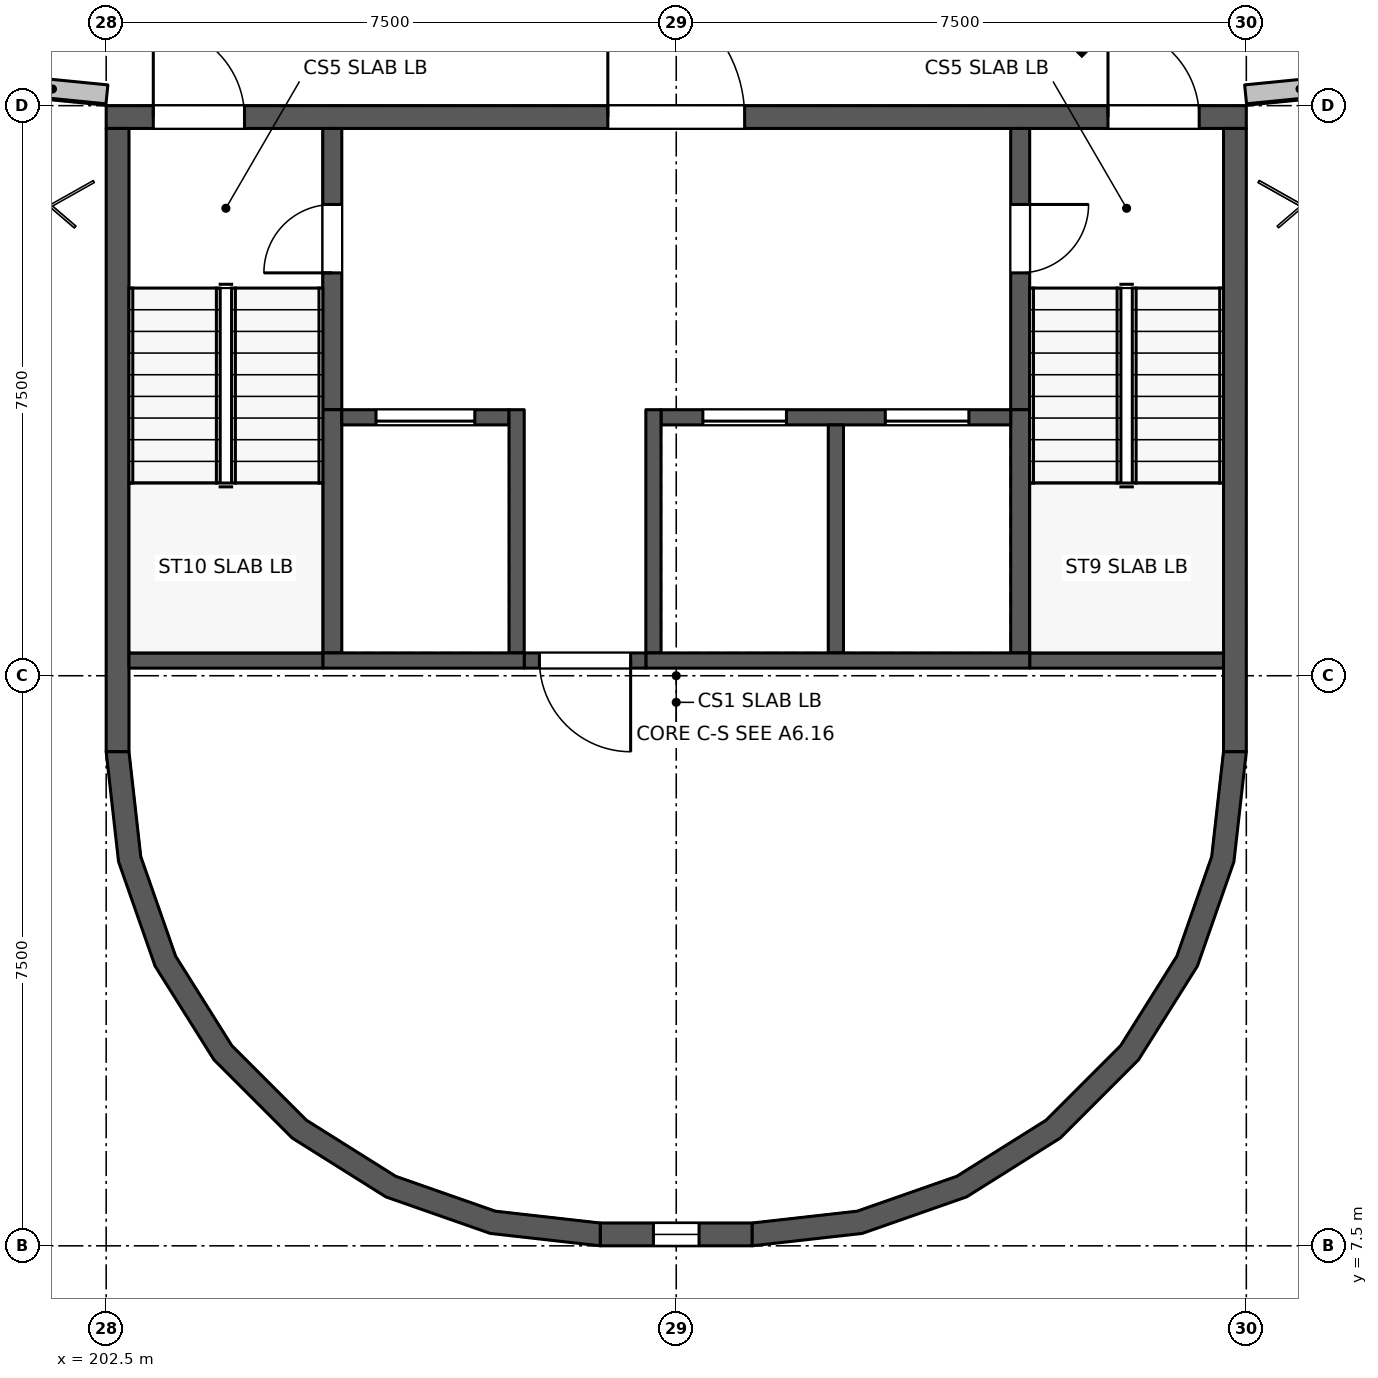
"""IFC4 building model, lengths in metres.
Left out: names, types, materials, properties, quantities, classifications, styles, units other than length and angle.
Written with IfcOpenShell. Run it as: python <this file> out.ifc"""

import sys

from ifc_helpers import new_model, si_unit, direction, frame, frame_2d, origin, place, context, subcontext, project, spatial, polyline, rectangle, outline, extrude, element, fill, save


model = new_model("IFC4")
c1 = context("Model", 3, precision=1e-05, world=origin(), true_north=direction((0.0, 1.0)))
c2 = subcontext(c1, "Body", "Model", "MODEL_VIEW")
j1 = project(units=[si_unit("LENGTHUNIT", "METRE"), si_unit("PLANEANGLEUNIT", "RADIAN")], contexts=[c1])
p1 = place(None, origin())
s1 = spatial("IfcSite", under=j1, at=p1, CompositionType="ELEMENT")
p2 = place(p1, origin())
s2 = spatial("IfcBuilding", under=s1, at=p2, CompositionType="ELEMENT")
p3 = place(p2, frame((0.0, 0.0, 6.6)))
s3 = spatial("IfcBuildingStorey", under=s2, at=p3, CompositionType="ELEMENT", Elevation=6.6)
p4 = place(p3, frame((201.077, 22.79, 0.0), z_axis=(0.0, 0.0, 1.0), x_axis=(0.995137391066, -0.098496562898, 0.0)))
e1 = element("IfcWall", 1, at=p4, inside=s3, PredefinedType="SOLIDWALL", context=c2, shape_type="SweptSolid", body=[
    extrude(rectangle(XDim=1.44, YDim=0.25, at=frame_2d((0.72, 0.0))), origin(), (0.0, 0.0, 1.0), 1.1),
])
p5 = place(p3, frame((217.49, 22.648, 0.0), z_axis=(0.0, 0.0, 1.0), x_axis=(0.995122410186, 0.098647801521, 0.0)))
e2 = element("IfcWall", 2, at=p5, inside=s3, PredefinedType="SOLIDWALL", context=c2, shape_type="SweptSolid", body=[
    extrude(rectangle(XDim=1.44, YDim=0.25, at=frame_2d((0.72, 0.0))), origin(), (0.0, 0.0, 1.0), 1.1),
])
p6 = place(p3, frame((202.5, 22.35, 0.0), z_axis=(0.0, 0.0, 1.0), x_axis=(1.0, 0.0, 0.0)))
e3 = element("IfcWall", 3, at=p6, inside=s3, PredefinedType="SHEAR", context=c2, shape_type="SweptSolid", body=[
    extrude(rectangle(XDim=15.0, YDim=0.3, at=frame_2d((7.5, 0.0))), origin(), (0.0, 0.0, 1.0), 3.3),
])
p7 = place(p6, frame((13.18, 0.0, 0.0)))
e4 = element("IfcOpeningElement", 4, at=p7, cuts=e3, PredefinedType="OPENING", context=c2, shape_type="SweptSolid", body=[
    extrude(rectangle(XDim=1.2, YDim=2.1, at=frame_2d((0.6, 1.05))), frame((0.0, 0.16, 0.0), z_axis=(0.0, -1.0, 0.0), x_axis=(1.0, 0.0, 0.0)), (0.0, 0.0, 1.0), 0.32),
])
p8 = place(p6, frame((0.62, 0.0, 0.0)))
e5 = element("IfcOpeningElement", 5, at=p8, cuts=e3, PredefinedType="OPENING", context=c2, shape_type="SweptSolid", body=[
    extrude(rectangle(XDim=1.2, YDim=2.1, at=frame_2d((0.6, 1.05))), frame((0.0, 0.16, 0.0), z_axis=(0.0, -1.0, 0.0), x_axis=(1.0, 0.0, 0.0)), (0.0, 0.0, 1.0), 0.32),
])
p9 = place(p6, frame((6.6, 0.0, 0.0)))
e6 = element("IfcOpeningElement", 6, at=p9, cuts=e3, PredefinedType="OPENING", context=c2, shape_type="SweptSolid", body=[
    extrude(rectangle(XDim=1.8, YDim=2.1, at=frame_2d((0.9, 1.05))), frame((0.0, 0.16, 0.0), z_axis=(0.0, -1.0, 0.0), x_axis=(1.0, 0.0, 0.0)), (0.0, 0.0, 1.0), 0.32),
])
p10 = place(p3, frame((211.0, 7.65, 0.0), z_axis=(0.0, 0.0, 1.0), x_axis=(-1.0, 0.0, 0.0)))
e7 = element("IfcWall", 7, at=p10, inside=s3, PredefinedType="SHEAR", context=c2, shape_type="SweptSolid", body=[
    extrude(rectangle(XDim=2.0, YDim=0.3, at=frame_2d((1.0, 0.0))), origin(), (0.0, 0.0, 1.0), 3.3),
])
p11 = place(p10, frame((0.7, 0.0, 0.3)))
e8 = element("IfcOpeningElement", 8, at=p11, cuts=e7, PredefinedType="OPENING", context=c2, shape_type="SweptSolid", body=[
    extrude(rectangle(XDim=0.6, YDim=2.7, at=frame_2d((0.3, 1.35))), frame((0.0, 0.16, 0.0), z_axis=(0.0, -1.0, 0.0), x_axis=(1.0, 0.0, 0.0)), (0.0, 0.0, 1.0), 0.32),
])
for number, where, z_axis, x_axis in (
    (9, (217.35, 22.2, 0.0), (0.0, 0.0, 1.0), (0.0, -1.0, 0.0)),
    (10, (202.65, 14.0, 0.0), (0.0, 0.0, 1.0), (0.0, 1.0, 0.0)),
):
    element("IfcWall", number, at=place(p3, frame(where, z_axis=z_axis, x_axis=x_axis)), inside=s3, PredefinedType="SHEAR", context=c2, shape_type="SweptSolid", body=[
        extrude(rectangle(XDim=8.2, YDim=0.3, at=frame_2d((4.1, 0.0))), origin(), (0.0, 0.0, 1.0), 3.3),
    ])
p12 = place(p3, frame((214.525, 22.2, 0.0), z_axis=(0.0, 0.0, 1.0), x_axis=(0.0, -1.0, 0.0)))
e11 = element("IfcWall", 11, at=p12, inside=s3, PredefinedType="STANDARD", context=c2, shape_type="SweptSolid", body=[
    extrude(rectangle(XDim=3.7, YDim=0.25, at=frame_2d((1.85, 0.0))), origin(), (0.0, 0.0, 1.0), 3.1),
])
p13 = place(p12, frame((1.0, 0.0, 0.0)))
e12 = element("IfcOpeningElement", 12, at=p13, cuts=e11, PredefinedType="OPENING", context=c2, shape_type="SweptSolid", body=[
    extrude(rectangle(XDim=0.9, YDim=2.1, at=frame_2d((0.45, 1.05))), frame((0.0, 0.135, 0.0), z_axis=(0.0, -1.0, 0.0), x_axis=(1.0, 0.0, 0.0)), (0.0, 0.0, 1.0), 0.27),
])
p14 = place(p3, frame((214.525, 18.5, 0.0), z_axis=(0.0, 0.0, 1.0), x_axis=(0.0, -1.0, 0.0)))
e13 = element("IfcWall", 13, at=p14, inside=s3, PredefinedType="STANDARD", context=c2, shape_type="SweptSolid", body=[
    extrude(rectangle(XDim=3.2, YDim=0.25, at=frame_2d((1.6, 0.0))), origin(), (0.0, 0.0, 1.0), 3.1),
])
p15 = place(p3, frame((205.475, 18.5, 0.0), z_axis=(0.0, 0.0, 1.0), x_axis=(0.0, 1.0, 0.0)))
e14 = element("IfcWall", 14, at=p15, inside=s3, PredefinedType="STANDARD", context=c2, shape_type="SweptSolid", body=[
    extrude(rectangle(XDim=3.7, YDim=0.25, at=frame_2d((1.85, 0.0))), origin(), (0.0, 0.0, 1.0), 3.1),
])
p16 = place(p15, frame((1.8, 0.0, 0.0)))
e15 = element("IfcOpeningElement", 15, at=p16, cuts=e14, PredefinedType="OPENING", context=c2, shape_type="SweptSolid", body=[
    extrude(rectangle(XDim=0.9, YDim=2.1, at=frame_2d((0.45, 1.05))), frame((0.0, 0.135, 0.0), z_axis=(0.0, -1.0, 0.0), x_axis=(1.0, 0.0, 0.0)), (0.0, 0.0, 1.0), 0.27),
])
p17 = place(p3, frame((205.475, 18.5, 0.0), z_axis=(0.0, 0.0, 1.0), x_axis=(0.0, -1.0, 0.0)))
e16 = element("IfcWall", 16, at=p17, inside=s3, PredefinedType="STANDARD", context=c2, shape_type="SweptSolid", body=[
    extrude(rectangle(XDim=3.2, YDim=0.25, at=frame_2d((1.6, 0.0))), origin(), (0.0, 0.0, 1.0), 3.1),
])
p18 = place(p3, frame((214.4, 18.4, 0.0), z_axis=(0.0, 0.0, 1.0), x_axis=(-1.0, 0.0, 0.0)))
e17 = element("IfcWall", 17, at=p18, inside=s3, PredefinedType="STANDARD", context=c2, shape_type="SweptSolid", body=[
    extrude(rectangle(XDim=4.6, YDim=0.2, at=frame_2d((2.3, 0.0))), origin(), (0.0, 0.0, 1.0), 3.1),
])
p19 = place(p18, frame((0.55, 0.0, 0.0)))
e18 = element("IfcOpeningElement", 18, at=p19, cuts=e17, PredefinedType="OPENING", context=c2, shape_type="SweptSolid", body=[
    extrude(rectangle(XDim=1.1, YDim=2.1, at=frame_2d((0.55, 1.05))), frame((0.0, 0.11, 0.0), z_axis=(0.0, -1.0, 0.0), x_axis=(1.0, 0.0, 0.0)), (0.0, 0.0, 1.0), 0.22),
])
p20 = place(p18, frame((2.95, 0.0, 0.0)))
e19 = element("IfcOpeningElement", 19, at=p20, cuts=e17, PredefinedType="OPENING", context=c2, shape_type="SweptSolid", body=[
    extrude(rectangle(XDim=1.1, YDim=2.1, at=frame_2d((0.55, 1.05))), frame((0.0, 0.11, 0.0), z_axis=(0.0, -1.0, 0.0), x_axis=(1.0, 0.0, 0.0)), (0.0, 0.0, 1.0), 0.22),
])
p21 = place(p3, frame((207.8, 18.4, 0.0), z_axis=(0.0, 0.0, 1.0), x_axis=(-1.0, 0.0, 0.0)))
e20 = element("IfcWall", 20, at=p21, inside=s3, PredefinedType="STANDARD", context=c2, shape_type="SweptSolid", body=[
    extrude(rectangle(XDim=2.2, YDim=0.2, at=frame_2d((1.1, 0.0))), origin(), (0.0, 0.0, 1.0), 3.1),
])
p22 = place(p21, frame((0.45, 0.0, 0.0)))
e21 = element("IfcOpeningElement", 21, at=p22, cuts=e20, PredefinedType="OPENING", context=c2, shape_type="SweptSolid", body=[
    extrude(rectangle(XDim=1.3, YDim=2.1, at=frame_2d((0.65, 1.05))), frame((0.0, 0.11, 0.0), z_axis=(0.0, -1.0, 0.0), x_axis=(1.0, 0.0, 0.0)), (0.0, 0.0, 1.0), 0.22),
])
p23 = place(p3, frame((212.1, 18.3, 0.0), z_axis=(0.0, 0.0, 1.0), x_axis=(0.0, -1.0, 0.0)))
e22 = element("IfcWall", 22, at=p23, inside=s3, PredefinedType="STANDARD", context=c2, shape_type="SweptSolid", body=[
    extrude(rectangle(XDim=3.0, YDim=0.2, at=frame_2d((1.5, 0.0))), origin(), (0.0, 0.0, 1.0), 3.1),
])
for number, where, z_axis, x_axis in (
    (23, (209.7, 18.5, 0.0), (0.0, 0.0, 1.0), (0.0, -1.0, 0.0)),
    (24, (207.9, 18.5, 0.0), (0.0, 0.0, 1.0), (0.0, -1.0, 0.0)),
):
    element("IfcWall", number, at=place(p3, frame(where, z_axis=z_axis, x_axis=x_axis)), inside=s3, PredefinedType="STANDARD", context=c2, shape_type="SweptSolid", body=[
        extrude(rectangle(XDim=3.2, YDim=0.2, at=frame_2d((1.6, 0.0))), origin(), (0.0, 0.0, 1.0), 3.1),
    ])
p24 = place(p3, frame((217.2, 15.2, 0.0), z_axis=(0.0, 0.0, 1.0), x_axis=(-1.0, 0.0, 0.0)))
e25 = element("IfcWall", 25, at=p24, inside=s3, PredefinedType="STANDARD", context=c2, shape_type="SweptSolid", body=[
    extrude(rectangle(XDim=2.55, YDim=0.2, at=frame_2d((1.275, 0.0))), origin(), (0.0, 0.0, 1.0), 3.1),
])
p25 = place(p3, frame((214.65, 15.2, 0.0), z_axis=(0.0, 0.0, 1.0), x_axis=(-1.0, 0.0, 0.0)))
e26 = element("IfcWall", 26, at=p25, inside=s3, PredefinedType="STANDARD", context=c2, shape_type="SweptSolid", body=[
    extrude(rectangle(XDim=5.05, YDim=0.2, at=frame_2d((2.525, 0.0))), origin(), (0.0, 0.0, 1.0), 3.1),
])
p26 = place(p3, frame((209.6, 15.2, 0.0), z_axis=(0.0, 0.0, 1.0), x_axis=(-1.0, 0.0, 0.0)))
e27 = element("IfcWall", 27, at=p26, inside=s3, PredefinedType="STANDARD", context=c2, shape_type="SweptSolid", body=[
    extrude(rectangle(XDim=1.6, YDim=0.2, at=frame_2d((0.8, 0.0))), origin(), (0.0, 0.0, 1.0), 3.1),
])
p27 = place(p26, frame((0.2, 0.0, 0.0)))
e28 = element("IfcOpeningElement", 28, at=p27, cuts=e27, PredefinedType="OPENING", context=c2, shape_type="SweptSolid", body=[
    extrude(rectangle(XDim=1.2, YDim=2.1, at=frame_2d((0.6, 1.05))), frame((0.0, 0.11, 0.0), z_axis=(0.0, -1.0, 0.0), x_axis=(1.0, 0.0, 0.0)), (0.0, 0.0, 1.0), 0.22),
])
p28 = place(p3, frame((208.0, 15.2, 0.0), z_axis=(0.0, 0.0, 1.0), x_axis=(-1.0, 0.0, 0.0)))
e29 = element("IfcWall", 29, at=p28, inside=s3, PredefinedType="STANDARD", context=c2, shape_type="SweptSolid", body=[
    extrude(rectangle(XDim=2.65, YDim=0.2, at=frame_2d((1.325, 0.0))), origin(), (0.0, 0.0, 1.0), 3.1),
])
p29 = place(p3, frame((205.35, 15.2, 0.0), z_axis=(0.0, 0.0, 1.0), x_axis=(-1.0, 0.0, 0.0)))
e30 = element("IfcWall", 30, at=p29, inside=s3, PredefinedType="STANDARD", context=c2, shape_type="SweptSolid", body=[
    extrude(rectangle(XDim=2.55, YDim=0.2, at=frame_2d((1.275, 0.0))), origin(), (0.0, 0.0, 1.0), 3.1),
])
p30 = place(p3, origin())
e31 = element("IfcWall", 31, at=p30, inside=s3, PredefinedType="SHEAR", context=c2, shape_type="SweptSolid", body=[
    extrude(outline(polyline([(217.5, 14.0), (217.337, 12.554), (216.856, 11.18), (216.082, 9.947), (215.053, 8.918), (213.82, 8.144), (212.446, 7.663), (211.0, 7.5), (211.0, 7.8), (212.38, 7.955), (213.69, 8.414), (214.865, 9.153), (215.847, 10.135), (216.586, 11.31), (217.045, 12.62), (217.2, 14.0), (217.5, 14.0)])), origin(), (0.0, 0.0, 1.0), 3.3),
])
p31 = place(p3, origin())
e32 = element("IfcWall", 32, at=p31, inside=s3, PredefinedType="SHEAR", context=c2, shape_type="SweptSolid", body=[
    extrude(outline(polyline([(202.5, 14.0), (202.663, 12.554), (203.144, 11.18), (203.918, 9.947), (204.947, 8.918), (206.18, 8.144), (207.554, 7.663), (209.0, 7.5), (209.0, 7.8), (207.62, 7.955), (206.31, 8.414), (205.135, 9.153), (204.153, 10.135), (203.414, 11.31), (202.955, 12.62), (202.8, 14.0), (202.5, 14.0)])), origin(), (0.0, 0.0, 1.0), 3.3),
])
p32 = place(p7, origin())
e33 = element("IfcDoor", 33, at=p32, inside=s3, OperationType="SINGLE_SWING_RIGHT", PredefinedType="DOOR", context=c2, shape_type="SweptSolid", body=[
    extrude(rectangle(XDim=1.2, YDim=2.1, at=frame_2d((0.6, 1.05))), frame((0.0, 0.025, 0.0), z_axis=(0.0, -1.0, 0.0), x_axis=(1.0, 0.0, 0.0)), (0.0, 0.0, 1.0), 0.05),
])
fill(e4, e33)
p33 = place(p8, origin())
e34 = element("IfcDoor", 34, at=p33, inside=s3, OperationType="SINGLE_SWING_LEFT", PredefinedType="DOOR", context=c2, shape_type="SweptSolid", body=[
    extrude(rectangle(XDim=1.2, YDim=2.1, at=frame_2d((0.6, 1.05))), frame((0.0, 0.025, 0.0), z_axis=(0.0, -1.0, 0.0), x_axis=(1.0, 0.0, 0.0)), (0.0, 0.0, 1.0), 0.05),
])
fill(e5, e34)
p34 = place(p9, origin())
e35 = element("IfcDoor", 35, at=p34, inside=s3, OperationType="DOUBLE_DOOR_SINGLE_SWING", PredefinedType="DOOR", context=c2, shape_type="SweptSolid", body=[
    extrude(rectangle(XDim=1.8, YDim=2.1, at=frame_2d((0.9, 1.05))), frame((0.0, 0.025, 0.0), z_axis=(0.0, -1.0, 0.0), x_axis=(1.0, 0.0, 0.0)), (0.0, 0.0, 1.0), 0.05),
])
fill(e6, e35)
p35 = place(p13, origin())
e36 = element("IfcDoor", 36, at=p35, inside=s3, OperationType="SINGLE_SWING_LEFT", PredefinedType="DOOR", context=c2, shape_type="SweptSolid", body=[
    extrude(rectangle(XDim=0.9, YDim=2.1, at=frame_2d((0.45, 1.05))), frame((0.0, 0.025, 0.0), z_axis=(0.0, -1.0, 0.0), x_axis=(1.0, 0.0, 0.0)), (0.0, 0.0, 1.0), 0.05),
])
fill(e12, e36)
p36 = place(p16, origin())
e37 = element("IfcDoor", 37, at=p36, inside=s3, OperationType="SINGLE_SWING_RIGHT", PredefinedType="DOOR", context=c2, shape_type="SweptSolid", body=[
    extrude(rectangle(XDim=0.9, YDim=2.1, at=frame_2d((0.45, 1.05))), frame((0.0, 0.025, 0.0), z_axis=(0.0, -1.0, 0.0), x_axis=(1.0, 0.0, 0.0)), (0.0, 0.0, 1.0), 0.05),
])
fill(e15, e37)
p37 = place(p19, origin())
e38 = element("IfcDoor", 38, at=p37, inside=s3, OperationType="DOUBLE_DOOR_SLIDING", PredefinedType="DOOR", context=c2, shape_type="SweptSolid", body=[
    extrude(rectangle(XDim=1.1, YDim=2.1, at=frame_2d((0.55, 1.05))), frame((0.0, 0.025, 0.0), z_axis=(0.0, -1.0, 0.0), x_axis=(1.0, 0.0, 0.0)), (0.0, 0.0, 1.0), 0.05),
])
fill(e18, e38)
p38 = place(p20, origin())
e39 = element("IfcDoor", 39, at=p38, inside=s3, OperationType="DOUBLE_DOOR_SLIDING", PredefinedType="DOOR", context=c2, shape_type="SweptSolid", body=[
    extrude(rectangle(XDim=1.1, YDim=2.1, at=frame_2d((0.55, 1.05))), frame((0.0, 0.025, 0.0), z_axis=(0.0, -1.0, 0.0), x_axis=(1.0, 0.0, 0.0)), (0.0, 0.0, 1.0), 0.05),
])
fill(e19, e39)
p39 = place(p22, origin())
e40 = element("IfcDoor", 40, at=p39, inside=s3, OperationType="DOUBLE_DOOR_SLIDING", PredefinedType="DOOR", context=c2, shape_type="SweptSolid", body=[
    extrude(rectangle(XDim=1.3, YDim=2.1, at=frame_2d((0.65, 1.05))), frame((0.0, 0.025, 0.0), z_axis=(0.0, -1.0, 0.0), x_axis=(1.0, 0.0, 0.0)), (0.0, 0.0, 1.0), 0.05),
])
fill(e21, e40)
p40 = place(p27, origin())
e41 = element("IfcDoor", 41, at=p40, inside=s3, OperationType="SINGLE_SWING_RIGHT", PredefinedType="DOOR", context=c2, shape_type="SweptSolid", body=[
    extrude(rectangle(XDim=1.2, YDim=2.1, at=frame_2d((0.6, 1.05))), frame((0.0, 0.025, 0.0), z_axis=(0.0, -1.0, 0.0), x_axis=(1.0, 0.0, 0.0)), (0.0, 0.0, 1.0), 0.05),
])
fill(e28, e41)
p41 = place(p11, origin())
e42 = element("IfcWindow", 42, at=p41, inside=s3, PartitioningType="SINGLE_PANEL", PredefinedType="WINDOW", context=c2, shape_type="SweptSolid", body=[
    extrude(rectangle(XDim=0.6, YDim=2.7, at=frame_2d((0.3, 1.35))), frame((0.0, 0.03, 0.0), z_axis=(0.0, -1.0, 0.0), x_axis=(1.0, 0.0, 0.0)), (0.0, 0.0, 1.0), 0.06),
])
fill(e8, e42)
save(model, sys.argv[1])
